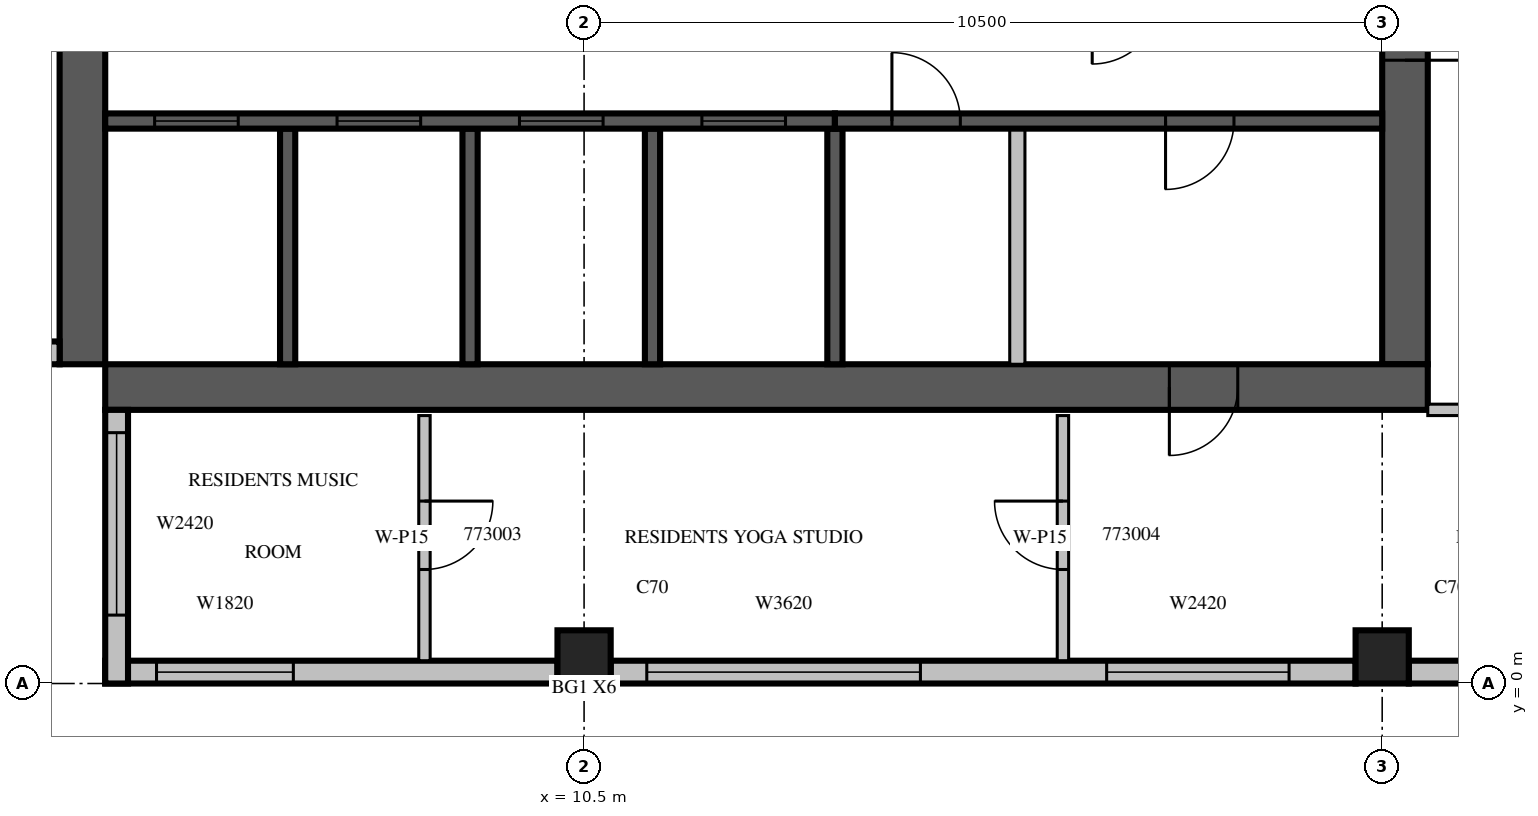
"""IFC4 building model, lengths in metres.
Left out: names, types, materials, properties, quantities, classifications, styles, units other than length and angle.
Written with IfcOpenShell. Run it as: python <this file> out.ifc"""

import sys

from ifc_helpers import new_model, si_unit, direction, frame, frame_2d, origin, origin_2d, place, context, subcontext, project, spatial, rectangle, extrude, source, transform, mapped, element, fill, save


model = new_model("IFC4")
c1 = context("Model", 3, precision=1e-05, world=origin(), true_north=direction((0.0, 1.0)))
c2 = subcontext(c1, "Body", "Model", "MODEL_VIEW")
j1 = project(units=[si_unit("LENGTHUNIT", "METRE"), si_unit("PLANEANGLEUNIT", "RADIAN")], contexts=[c1])
p1 = place(None, origin())
s1 = spatial("IfcSite", under=j1, at=p1, CompositionType="ELEMENT")
p2 = place(p1, origin())
s2 = spatial("IfcBuilding", under=s1, at=p2, CompositionType="ELEMENT")
p3 = place(p2, frame((0.0, 0.0, 316.0)))
s3 = spatial("IfcBuildingStorey", under=s2, at=p3, CompositionType="ELEMENT", Elevation=316.0)
m1 = source(origin(), c2, "Body", "SweptSolid", [
    extrude(rectangle(XDim=0.7, YDim=0.7, at=origin_2d()), origin(), (0.0, 0.0, 1.0), 3.5),
])
for number, where, z_axis, x_axis in (
    (1, (10.5, 0.35, 0.0), (0.0, 0.0, 1.0), (1.0, 0.0, 0.0)),
    (2, (21.0, 0.35, 0.0), (0.0, 0.0, 1.0), (1.0, 0.0, 0.0)),
):
    element("IfcColumn", number, at=place(p3, frame(where, z_axis=z_axis, x_axis=x_axis)), inside=s3, PredefinedType="COLUMN", context=c2, shape_type="MappedRepresentation", body=[
        mapped(m1, transform((0.0, 0.0, 0.0), scale=1.0)),
    ])
m2 = source(origin(), c2, "Body", "SweptSolid", [
    extrude(rectangle(XDim=17.4, YDim=0.6, at=frame_2d((8.7, 0.0))), origin(), (0.0, 0.0, 1.0), 3.5),
])
p4 = place(p3, frame((3.9, 4.2, 0.0), z_axis=(0.0, 0.0, 1.0), x_axis=(0.0, 1.0, 0.0)))
e3 = element("IfcWall", 3, at=p4, inside=s3, PredefinedType="SHEAR", context=c2, shape_type="MappedRepresentation", body=[
    mapped(m2, transform((0.0, 0.0, 0.0), scale=1.0)),
])
m3 = source(origin(), c2, "Body", "SweptSolid", [
    extrude(rectangle(XDim=2.2, YDim=2.1, at=frame_2d((1.1, 1.05))), frame((0.0, 0.31, 0.0), z_axis=(0.0, -1.0, 0.0), x_axis=(1.0, 0.0, 0.0)), (0.0, 0.0, 1.0), 0.62),
])
p5 = place(p4, frame((4.2, 0.0, 0.0)))
e4 = element("IfcOpeningElement", 4, at=p5, cuts=e3, PredefinedType="OPENING", context=c2, shape_type="MappedRepresentation", body=[
    mapped(m3, transform((0.0, 0.0, 0.0), scale=1.0)),
])
m4 = source(origin(), c2, "Body", "SweptSolid", [
    extrude(rectangle(XDim=6.3, YDim=0.6, at=frame_2d((3.15, 0.0))), origin(), (0.0, 0.0, 1.0), 3.5),
])
p6 = place(p3, frame((21.3, 4.2, 0.0), z_axis=(0.0, 0.0, 1.0), x_axis=(0.0, 1.0, 0.0)))
e5 = element("IfcWall", 5, at=p6, inside=s3, PredefinedType="SHEAR", context=c2, shape_type="MappedRepresentation", body=[
    mapped(m4, transform((0.0, 0.0, 0.0), scale=1.0)),
])
p7 = place(p6, frame((4.0, 0.0, 0.0)))
e6 = element("IfcOpeningElement", 6, at=p7, cuts=e5, PredefinedType="OPENING", context=c2, shape_type="MappedRepresentation", body=[
    mapped(m3, transform((0.0, 0.0, 0.0), scale=1.0)),
])
p8 = place(p3, frame((4.2, 3.9, 0.0), z_axis=(0.0, 0.0, 1.0), x_axis=(1.0, 0.0, 0.0)))
e7 = element("IfcWall", 7, at=p8, inside=s3, PredefinedType="SHEAR", context=c2, shape_type="MappedRepresentation", body=[
    mapped(m2, transform((0.0, 0.0, 0.0), scale=1.0)),
])
m5 = source(origin(), c2, "Body", "SweptSolid", [
    extrude(rectangle(XDim=0.9, YDim=2.1, at=frame_2d((0.45, 1.05))), frame((0.0, 0.31, 0.0), z_axis=(0.0, -1.0, 0.0), x_axis=(1.0, 0.0, 0.0)), (0.0, 0.0, 1.0), 0.62),
])
p9 = place(p8, frame((14.0, 0.0, 0.0)))
e8 = element("IfcOpeningElement", 8, at=p9, cuts=e7, PredefinedType="OPENING", context=c2, shape_type="MappedRepresentation", body=[
    mapped(m5, transform((0.0, 0.0, 0.0), scale=1.0)),
])
m6 = source(origin(), c2, "Body", "SweptSolid", [
    extrude(rectangle(XDim=5.95, YDim=0.3, at=frame_2d((2.975, 0.0))), origin(), (0.0, 0.0, 1.0), 3.1),
])
p10 = place(p3, frame((4.2, 0.15, 0.0), z_axis=(0.0, 0.0, 1.0), x_axis=(1.0, 0.0, 0.0)))
e9 = element("IfcWall", 9, at=p10, inside=s3, PredefinedType="STANDARD", context=c2, shape_type="MappedRepresentation", body=[
    mapped(m6, transform((0.0, 0.0, 0.0), scale=1.0)),
])
m7 = source(origin(), c2, "Body", "SweptSolid", [
    extrude(rectangle(XDim=1.8, YDim=2.0, at=frame_2d((0.9, 1.0))), frame((0.0, 0.16, 0.0), z_axis=(0.0, -1.0, 0.0), x_axis=(1.0, 0.0, 0.0)), (0.0, 0.0, 1.0), 0.32),
])
p11 = place(p10, frame((0.675, 0.0, 0.6)))
e10 = element("IfcOpeningElement", 10, at=p11, cuts=e9, PredefinedType="OPENING", context=c2, shape_type="MappedRepresentation", body=[
    mapped(m7, transform((0.0, 0.0, 0.0), scale=1.0)),
])
m8 = source(origin(), c2, "Body", "SweptSolid", [
    extrude(rectangle(XDim=9.8, YDim=0.3, at=frame_2d((4.9, 0.0))), origin(), (0.0, 0.0, 1.0), 3.1),
])
p12 = place(p3, frame((10.85, 0.15, 0.0), z_axis=(0.0, 0.0, 1.0), x_axis=(1.0, 0.0, 0.0)))
e11 = element("IfcWall", 11, at=p12, inside=s3, PredefinedType="STANDARD", context=c2, shape_type="MappedRepresentation", body=[
    mapped(m8, transform((0.0, 0.0, 0.0), scale=1.0)),
])
m9 = source(origin(), c2, "Body", "SweptSolid", [
    extrude(rectangle(XDim=3.6, YDim=2.0, at=frame_2d((1.8, 1.0))), frame((0.0, 0.16, 0.0), z_axis=(0.0, -1.0, 0.0), x_axis=(1.0, 0.0, 0.0)), (0.0, 0.0, 1.0), 0.32),
])
p13 = place(p12, frame((0.475, 0.0, 0.6)))
e12 = element("IfcOpeningElement", 12, at=p13, cuts=e11, PredefinedType="OPENING", context=c2, shape_type="MappedRepresentation", body=[
    mapped(m9, transform((0.0, 0.0, 0.0), scale=1.0)),
])
m10 = source(origin(), c2, "Body", "SweptSolid", [
    extrude(rectangle(XDim=2.4, YDim=2.0, at=frame_2d((1.2, 1.0))), frame((0.0, 0.16, 0.0), z_axis=(0.0, -1.0, 0.0), x_axis=(1.0, 0.0, 0.0)), (0.0, 0.0, 1.0), 0.32),
])
p14 = place(p12, frame((6.525, 0.0, 0.6)))
e13 = element("IfcOpeningElement", 13, at=p14, cuts=e11, PredefinedType="OPENING", context=c2, shape_type="MappedRepresentation", body=[
    mapped(m10, transform((0.0, 0.0, 0.0), scale=1.0)),
])
m11 = source(origin(), c2, "Body", "SweptSolid", [
    extrude(rectangle(XDim=7.7, YDim=0.3, at=frame_2d((3.85, 0.0))), origin(), (0.0, 0.0, 1.0), 3.1),
])
p15 = place(p3, frame((21.35, 0.15, 0.0), z_axis=(0.0, 0.0, 1.0), x_axis=(1.0, 0.0, 0.0)))
e14 = element("IfcWall", 14, at=p15, inside=s3, PredefinedType="STANDARD", context=c2, shape_type="MappedRepresentation", body=[
    mapped(m11, transform((0.0, 0.0, 0.0), scale=1.0)),
])
p16 = place(p15, frame((1.0, 0.0, 0.6)))
e15 = element("IfcOpeningElement", 15, at=p16, cuts=e14, PredefinedType="OPENING", context=c2, shape_type="MappedRepresentation", body=[
    mapped(m10, transform((0.0, 0.0, 0.0), scale=1.0)),
])
p17 = place(p15, frame((4.9, 0.0, 0.6)))
e16 = element("IfcOpeningElement", 16, at=p17, cuts=e14, PredefinedType="OPENING", context=c2, shape_type="MappedRepresentation", body=[
    mapped(m10, transform((0.0, 0.0, 0.0), scale=1.0)),
])
m12 = source(origin(), c2, "Body", "SweptSolid", [
    extrude(rectangle(XDim=3.6, YDim=0.3, at=frame_2d((1.8, 0.0))), origin(), (0.0, 0.0, 1.0), 3.1),
])
p18 = place(p3, frame((0.0, 4.35, 0.0), z_axis=(0.0, 0.0, 1.0), x_axis=(1.0, 0.0, 0.0)))
e17 = element("IfcWall", 17, at=p18, inside=s3, PredefinedType="STANDARD", context=c2, shape_type="MappedRepresentation", body=[
    mapped(m12, transform((0.0, 0.0, 0.0), scale=1.0)),
])
p19 = place(p18, frame((0.9, 0.0, 0.6)))
e18 = element("IfcOpeningElement", 18, at=p19, cuts=e17, PredefinedType="OPENING", context=c2, shape_type="MappedRepresentation", body=[
    mapped(m10, transform((0.0, 0.0, 0.0), scale=1.0)),
])
p20 = place(p3, frame((4.35, 3.6, 0.0), z_axis=(0.0, 0.0, 1.0), x_axis=(0.0, -1.0, 0.0)))
e19 = element("IfcWall", 19, at=p20, inside=s3, PredefinedType="STANDARD", context=c2, shape_type="MappedRepresentation", body=[
    mapped(m12, transform((0.0, 0.0, 0.0), scale=1.0)),
])
p21 = place(p20, frame((0.3, 0.0, 0.6)))
e20 = element("IfcOpeningElement", 20, at=p21, cuts=e19, PredefinedType="OPENING", context=c2, shape_type="MappedRepresentation", body=[
    mapped(m10, transform((0.0, 0.0, 0.0), scale=1.0)),
])
m13 = source(origin(), c2, "Body", "SweptSolid", [
    extrude(rectangle(XDim=3.1, YDim=0.2, at=frame_2d((1.55, 0.0))), origin(), (0.0, 0.0, 1.0), 3.5),
])
for number, where, z_axis, x_axis in (
    (21, (6.6, 4.2, 0.0), (0.0, 0.0, 1.0), (0.0, 1.0, 0.0)),
    (22, (9.0, 4.2, 0.0), (0.0, 0.0, 1.0), (0.0, 1.0, 0.0)),
    (23, (11.4, 4.2, 0.0), (0.0, 0.0, 1.0), (0.0, 1.0, 0.0)),
):
    element("IfcWall", number, at=place(p3, frame(where, z_axis=z_axis, x_axis=x_axis)), inside=s3, PredefinedType="SOLIDWALL", context=c2, shape_type="MappedRepresentation", body=[
        mapped(m13, transform((0.0, 0.0, 0.0), scale=1.0)),
    ])
m14 = source(origin(), c2, "Body", "SweptSolid", [
    extrude(rectangle(XDim=3.1, YDim=0.2, at=frame_2d((1.55, 0.0))), origin(), (0.0, 0.0, 1.0), 3.1),
])
p22 = place(p3, frame((13.8, 4.2, 0.0), z_axis=(0.0, 0.0, 1.0), x_axis=(0.0, 1.0, 0.0)))
e24 = element("IfcWall", 24, at=p22, inside=s3, PredefinedType="SOLIDWALL", context=c2, shape_type="MappedRepresentation", body=[
    mapped(m14, transform((0.0, 0.0, 0.0), scale=1.0)),
])
m15 = source(origin(), c2, "Body", "SweptSolid", [
    extrude(rectangle(XDim=3.1, YDim=0.2, at=frame_2d((1.55, 0.0))), origin(), (0.0, 0.0, 1.0), 3.1),
])
p23 = place(p3, frame((16.2, 4.2, 0.0), z_axis=(0.0, 0.0, 1.0), x_axis=(0.0, 1.0, 0.0)))
e25 = element("IfcWall", 25, at=p23, inside=s3, PredefinedType="PARTITIONING", context=c2, shape_type="MappedRepresentation", body=[
    mapped(m15, transform((0.0, 0.0, 0.0), scale=1.0)),
])
m16 = source(origin(), c2, "Body", "SweptSolid", [
    extrude(rectangle(XDim=9.6, YDim=0.2, at=frame_2d((4.8, 0.0))), origin(), (0.0, 0.0, 1.0), 3.5),
])
p24 = place(p3, frame((4.2, 7.4, 0.0), z_axis=(0.0, 0.0, 1.0), x_axis=(1.0, 0.0, 0.0)))
e26 = element("IfcWall", 26, at=p24, inside=s3, PredefinedType="SOLIDWALL", context=c2, shape_type="MappedRepresentation", body=[
    mapped(m16, transform((0.0, 0.0, 0.0), scale=1.0)),
])
m17 = source(origin(), c2, "Body", "SweptSolid", [
    extrude(rectangle(XDim=1.1, YDim=2.1, at=frame_2d((0.55, 1.05))), frame((0.0, 0.11, 0.0), z_axis=(0.0, -1.0, 0.0), x_axis=(1.0, 0.0, 0.0)), (0.0, 0.0, 1.0), 0.22),
])
p25 = place(p24, frame((0.65, 0.0, 0.0)))
e27 = element("IfcOpeningElement", 27, at=p25, cuts=e26, PredefinedType="OPENING", context=c2, shape_type="MappedRepresentation", body=[
    mapped(m17, transform((0.0, 0.0, 0.0), scale=1.0)),
])
p26 = place(p24, frame((3.05, 0.0, 0.0)))
e28 = element("IfcOpeningElement", 28, at=p26, cuts=e26, PredefinedType="OPENING", context=c2, shape_type="MappedRepresentation", body=[
    mapped(m17, transform((0.0, 0.0, 0.0), scale=1.0)),
])
p27 = place(p24, frame((5.45, 0.0, 0.0)))
e29 = element("IfcOpeningElement", 29, at=p27, cuts=e26, PredefinedType="OPENING", context=c2, shape_type="MappedRepresentation", body=[
    mapped(m17, transform((0.0, 0.0, 0.0), scale=1.0)),
])
p28 = place(p24, frame((7.85, 0.0, 0.0)))
e30 = element("IfcOpeningElement", 30, at=p28, cuts=e26, PredefinedType="OPENING", context=c2, shape_type="MappedRepresentation", body=[
    mapped(m17, transform((0.0, 0.0, 0.0), scale=1.0)),
])
m18 = source(origin(), c2, "Body", "SweptSolid", [
    extrude(rectangle(XDim=7.2, YDim=0.2, at=frame_2d((3.6, 0.0))), origin(), (0.0, 0.0, 1.0), 3.1),
])
p29 = place(p3, frame((13.8, 7.4, 0.0), z_axis=(0.0, 0.0, 1.0), x_axis=(1.0, 0.0, 0.0)))
e31 = element("IfcWall", 31, at=p29, inside=s3, PredefinedType="SOLIDWALL", context=c2, shape_type="MappedRepresentation", body=[
    mapped(m18, transform((0.0, 0.0, 0.0), scale=1.0)),
])
m19 = source(origin(), c2, "Body", "SweptSolid", [
    extrude(rectangle(XDim=0.9, YDim=2.1, at=frame_2d((0.45, 1.05))), frame((0.0, 0.11, 0.0), z_axis=(0.0, -1.0, 0.0), x_axis=(1.0, 0.0, 0.0)), (0.0, 0.0, 1.0), 0.22),
])
p30 = place(p29, frame((0.75, 0.0, 0.0)))
e32 = element("IfcOpeningElement", 32, at=p30, cuts=e31, PredefinedType="OPENING", context=c2, shape_type="MappedRepresentation", body=[
    mapped(m19, transform((0.0, 0.0, 0.0), scale=1.0)),
])
p31 = place(p29, frame((4.35, 0.0, 0.0)))
e33 = element("IfcOpeningElement", 33, at=p31, cuts=e31, PredefinedType="OPENING", context=c2, shape_type="MappedRepresentation", body=[
    mapped(m19, transform((0.0, 0.0, 0.0), scale=1.0)),
])
m20 = source(origin(), c2, "Body", "SweptSolid", [
    extrude(rectangle(XDim=3.225, YDim=0.15, at=frame_2d((1.613, 0.0))), origin(), (0.0, 0.0, 1.0), 3.1),
])
p32 = place(p3, frame((8.4, 3.525, 0.0), z_axis=(0.0, 0.0, 1.0), x_axis=(0.0, -1.0, 0.0)))
e34 = element("IfcWall", 34, at=p32, inside=s3, PredefinedType="PARTITIONING", context=c2, shape_type="MappedRepresentation", body=[
    mapped(m20, transform((0.0, 0.0, 0.0), scale=1.0)),
])
m21 = source(origin(), c2, "Body", "SweptSolid", [
    extrude(rectangle(XDim=0.9, YDim=2.1, at=frame_2d((0.45, 1.05))), frame((0.0, 0.085, 0.0), z_axis=(0.0, -1.0, 0.0), x_axis=(1.0, 0.0, 0.0)), (0.0, 0.0, 1.0), 0.17),
])
p33 = place(p32, frame((1.125, 0.0, 0.0)))
e35 = element("IfcOpeningElement", 35, at=p33, cuts=e34, PredefinedType="OPENING", context=c2, shape_type="MappedRepresentation", body=[
    mapped(m21, transform((0.0, 0.0, 0.0), scale=1.0)),
])
p34 = place(p3, frame((16.8, 3.525, 0.0), z_axis=(0.0, 0.0, 1.0), x_axis=(0.0, -1.0, 0.0)))
e36 = element("IfcWall", 36, at=p34, inside=s3, PredefinedType="PARTITIONING", context=c2, shape_type="MappedRepresentation", body=[
    mapped(m20, transform((0.0, 0.0, 0.0), scale=1.0)),
])
p35 = place(p34, frame((1.125, 0.0, 0.0)))
e37 = element("IfcOpeningElement", 37, at=p35, cuts=e36, PredefinedType="OPENING", context=c2, shape_type="MappedRepresentation", body=[
    mapped(m21, transform((0.0, 0.0, 0.0), scale=1.0)),
])
m22 = source(origin(), c2, "Body", "SweptSolid", [
    extrude(rectangle(XDim=7.725, YDim=0.15, at=frame_2d((3.862, 0.0))), origin(), (0.0, 0.0, 1.0), 3.1),
])
p36 = place(p3, frame((21.6, 3.6, 0.0), z_axis=(0.0, 0.0, 1.0), x_axis=(1.0, 0.0, 0.0)))
e38 = element("IfcWall", 38, at=p36, inside=s3, PredefinedType="PARTITIONING", context=c2, shape_type="MappedRepresentation", body=[
    mapped(m22, transform((0.0, 0.0, 0.0), scale=1.0)),
])
m23 = source(origin(), c2, "Body", "SweptSolid", [
    extrude(rectangle(XDim=1.2, YDim=2.1, at=frame_2d((0.6, 1.05))), frame((0.0, 0.085, 0.0), z_axis=(0.0, -1.0, 0.0), x_axis=(1.0, 0.0, 0.0)), (0.0, 0.0, 1.0), 0.17),
])
p37 = place(p36, frame((0.7, 0.0, 0.0)))
e39 = element("IfcOpeningElement", 39, at=p37, cuts=e38, PredefinedType="OPENING", context=c2, shape_type="MappedRepresentation", body=[
    mapped(m23, transform((0.0, 0.0, 0.0), scale=1.0)),
])
m24 = source(origin(), c2, "Body", "SweptSolid", [
    extrude(rectangle(XDim=1.8, YDim=2.0, at=frame_2d((0.9, 1.0))), frame((0.0, 0.03, 0.0), z_axis=(0.0, -1.0, 0.0), x_axis=(1.0, 0.0, 0.0)), (0.0, 0.0, 1.0), 0.06),
])
p38 = place(p11, origin())
e40 = element("IfcWindow", 40, at=p38, inside=s3, PartitioningType="SINGLE_PANEL", PredefinedType="WINDOW", context=c2, shape_type="MappedRepresentation", body=[
    mapped(m24, transform((0.0, 0.0, 0.0), scale=1.0)),
])
fill(e10, e40)
m25 = source(origin(), c2, "Body", "SweptSolid", [
    extrude(rectangle(XDim=3.6, YDim=2.0, at=frame_2d((1.8, 1.0))), frame((0.0, 0.03, 0.0), z_axis=(0.0, -1.0, 0.0), x_axis=(1.0, 0.0, 0.0)), (0.0, 0.0, 1.0), 0.06),
])
p39 = place(p13, origin())
e41 = element("IfcWindow", 41, at=p39, inside=s3, PartitioningType="SINGLE_PANEL", PredefinedType="WINDOW", context=c2, shape_type="MappedRepresentation", body=[
    mapped(m25, transform((0.0, 0.0, 0.0), scale=1.0)),
])
fill(e12, e41)
m26 = source(origin(), c2, "Body", "SweptSolid", [
    extrude(rectangle(XDim=2.4, YDim=2.0, at=frame_2d((1.2, 1.0))), frame((0.0, 0.03, 0.0), z_axis=(0.0, -1.0, 0.0), x_axis=(1.0, 0.0, 0.0)), (0.0, 0.0, 1.0), 0.06),
])
p40 = place(p14, origin())
e42 = element("IfcWindow", 42, at=p40, inside=s3, PartitioningType="SINGLE_PANEL", PredefinedType="WINDOW", context=c2, shape_type="MappedRepresentation", body=[
    mapped(m26, transform((0.0, 0.0, 0.0), scale=1.0)),
])
fill(e13, e42)
p41 = place(p21, origin())
e43 = element("IfcWindow", 43, at=p41, inside=s3, PartitioningType="SINGLE_PANEL", PredefinedType="WINDOW", context=c2, shape_type="MappedRepresentation", body=[
    mapped(m26, transform((0.0, 0.0, 0.0), scale=1.0)),
])
fill(e20, e43)
m27 = source(origin(), c2, "Body", "SweptSolid", [
    extrude(rectangle(XDim=1.1, YDim=2.1, at=frame_2d((0.55, 1.05))), frame((0.0, 0.025, 0.0), z_axis=(0.0, -1.0, 0.0), x_axis=(1.0, 0.0, 0.0)), (0.0, 0.0, 1.0), 0.05),
])
p42 = place(p25, origin())
e44 = element("IfcDoor", 44, at=p42, inside=s3, OperationType="SLIDING_TO_LEFT", PredefinedType="DOOR", context=c2, shape_type="MappedRepresentation", body=[
    mapped(m27, transform((0.0, 0.0, 0.0), scale=1.0)),
])
fill(e27, e44)
p43 = place(p26, origin())
e45 = element("IfcDoor", 45, at=p43, inside=s3, OperationType="SLIDING_TO_LEFT", PredefinedType="DOOR", context=c2, shape_type="MappedRepresentation", body=[
    mapped(m27, transform((0.0, 0.0, 0.0), scale=1.0)),
])
fill(e28, e45)
p44 = place(p27, origin())
e46 = element("IfcDoor", 46, at=p44, inside=s3, OperationType="SLIDING_TO_LEFT", PredefinedType="DOOR", context=c2, shape_type="MappedRepresentation", body=[
    mapped(m27, transform((0.0, 0.0, 0.0), scale=1.0)),
])
fill(e29, e46)
p45 = place(p28, origin())
e47 = element("IfcDoor", 47, at=p45, inside=s3, OperationType="SLIDING_TO_LEFT", PredefinedType="DOOR", context=c2, shape_type="MappedRepresentation", body=[
    mapped(m27, transform((0.0, 0.0, 0.0), scale=1.0)),
])
fill(e30, e47)
m28 = source(origin(), c2, "Body", "SweptSolid", [
    extrude(rectangle(XDim=0.9, YDim=2.1, at=frame_2d((0.45, 1.05))), frame((0.0, 0.025, 0.0), z_axis=(0.0, -1.0, 0.0), x_axis=(1.0, 0.0, 0.0)), (0.0, 0.0, 1.0), 0.05),
])
p46 = place(p30, origin())
e48 = element("IfcDoor", 48, at=p46, inside=s3, OperationType="SINGLE_SWING_LEFT", PredefinedType="DOOR", context=c2, shape_type="MappedRepresentation", body=[
    mapped(m28, transform((0.0, 0.0, 0.0), scale=1.0)),
])
fill(e32, e48)
p47 = place(p31, origin())
e49 = element("IfcDoor", 49, at=p47, inside=s3, OperationType="SINGLE_SWING_RIGHT", PredefinedType="DOOR", context=c2, shape_type="MappedRepresentation", body=[
    mapped(m28, transform((0.0, 0.0, 0.0), scale=1.0)),
])
fill(e33, e49)
m29 = source(origin(), c2, "Body", "SweptSolid", [
    extrude(rectangle(XDim=2.2, YDim=2.1, at=frame_2d((1.1, 1.05))), frame((0.0, 0.025, 0.0), z_axis=(0.0, -1.0, 0.0), x_axis=(1.0, 0.0, 0.0)), (0.0, 0.0, 1.0), 0.05),
])
p48 = place(p7, origin())
e50 = element("IfcDoor", 50, at=p48, inside=s3, OperationType="DOUBLE_DOOR_SINGLE_SWING", PredefinedType="DOOR", context=c2, shape_type="MappedRepresentation", body=[
    mapped(m29, transform((0.0, 0.0, 0.0), scale=1.0)),
])
fill(e6, e50)
p49 = place(p9, origin())
e51 = element("IfcDoor", 51, at=p49, inside=s3, OperationType="SINGLE_SWING_RIGHT", PredefinedType="DOOR", context=c2, shape_type="MappedRepresentation", body=[
    mapped(m28, transform((0.0, 0.0, 0.0), scale=1.0)),
])
fill(e8, e51)
p50 = place(p33, origin())
e52 = element("IfcDoor", 52, at=p50, inside=s3, OperationType="SINGLE_SWING_LEFT", PredefinedType="DOOR", context=c2, shape_type="MappedRepresentation", body=[
    mapped(m28, transform((0.0, 0.0, 0.0), scale=1.0)),
])
fill(e35, e52)
p51 = place(p35, origin())
e53 = element("IfcDoor", 53, at=p51, inside=s3, OperationType="SINGLE_SWING_RIGHT", PredefinedType="DOOR", context=c2, shape_type="MappedRepresentation", body=[
    mapped(m28, transform((0.0, 0.0, 0.0), scale=1.0)),
])
fill(e37, e53)
save(model, sys.argv[1])
